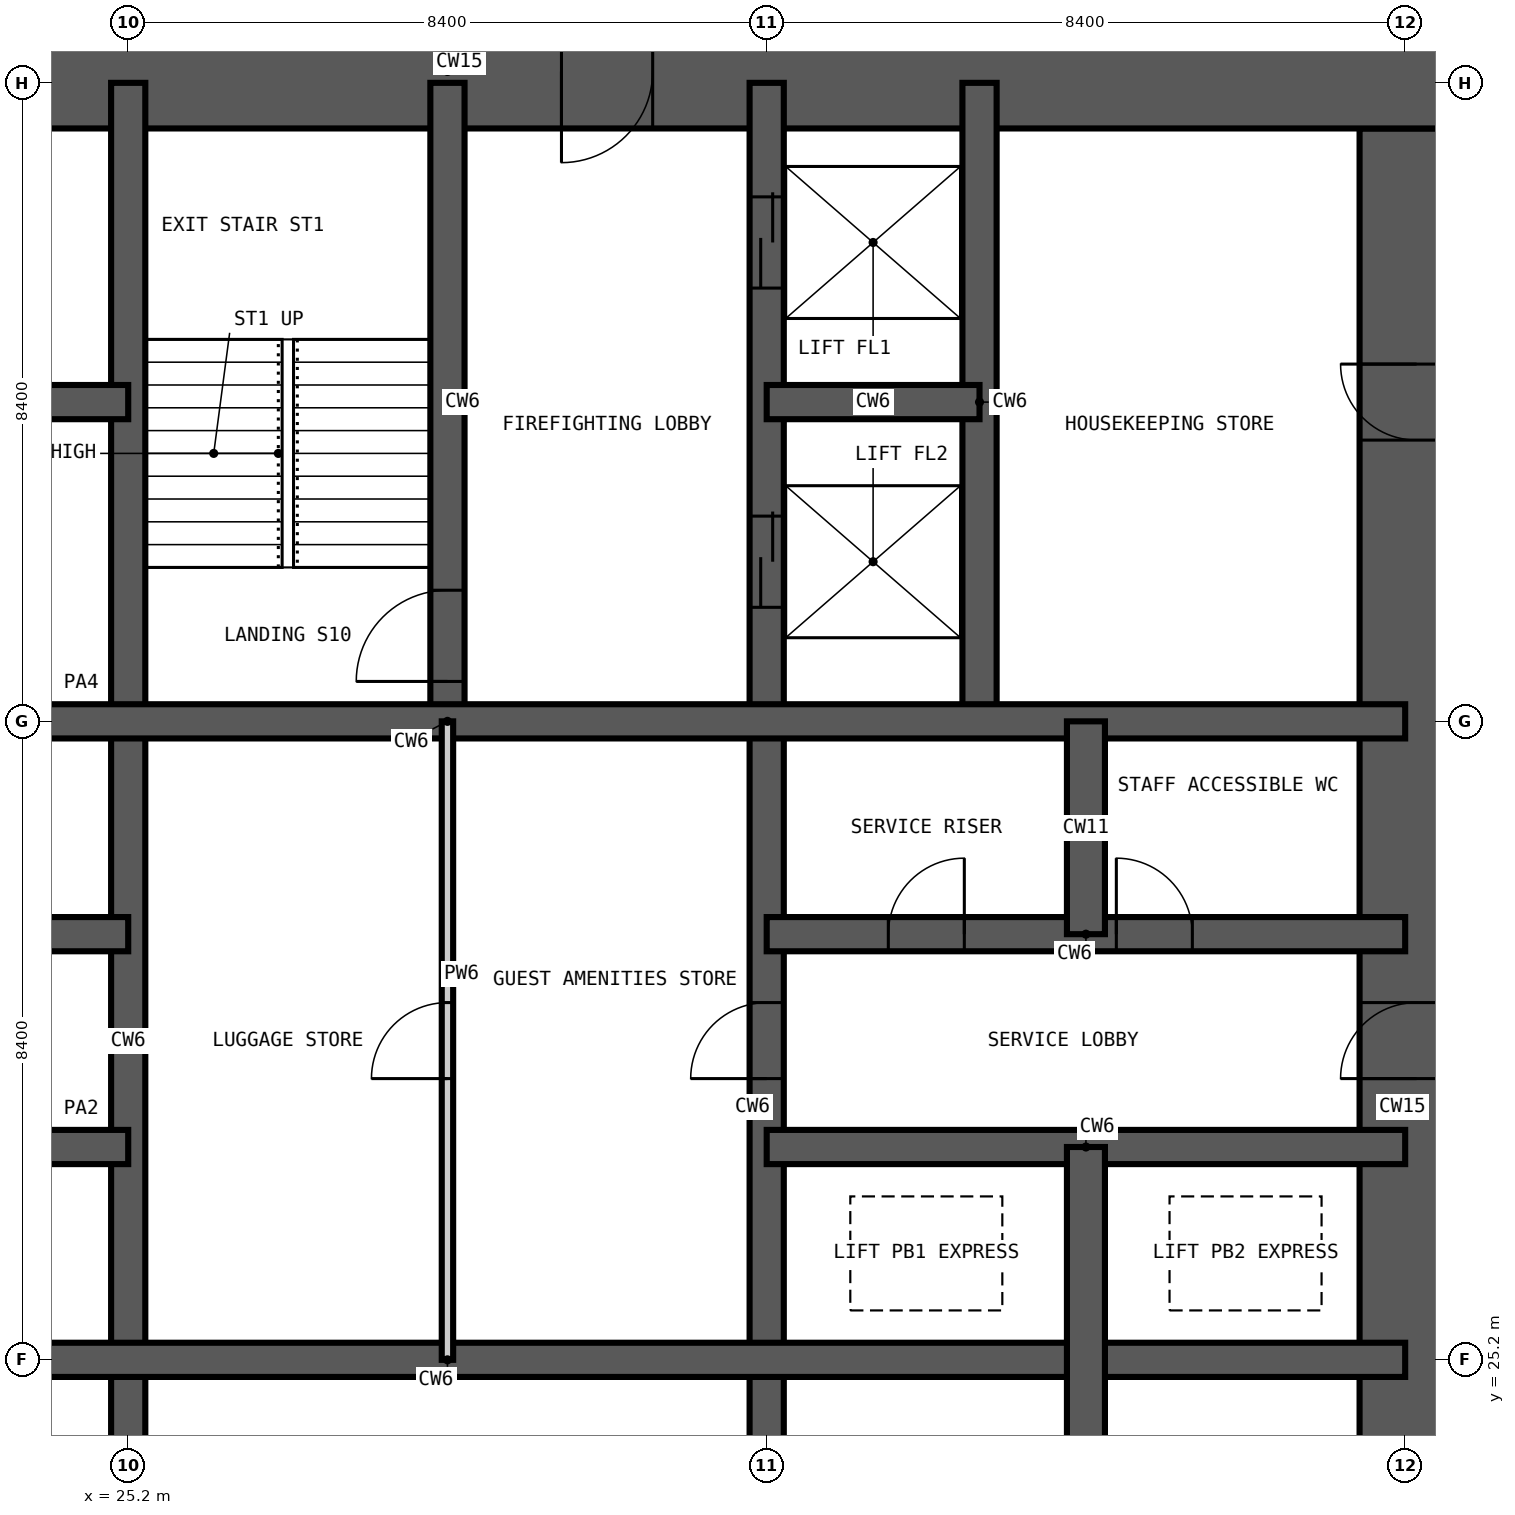
"""IFC4 building model, lengths in metres.
Left out: names, types, materials, properties, quantities, classifications, styles, units other than length and angle.
Written with IfcOpenShell. Run it as: python <this file> out.ifc"""

import sys

from ifc_helpers import new_model, si_unit, direction, frame, frame_2d, origin, place, context, subcontext, project, spatial, rectangle, extrude, element, fill, save


model = new_model("IFC4")
c1 = context("Model", 3, precision=1e-05, world=origin(), true_north=direction((0.0, 1.0)))
c2 = subcontext(c1, "Body", "Model", "MODEL_VIEW")
j1 = project(units=[si_unit("LENGTHUNIT", "METRE"), si_unit("PLANEANGLEUNIT", "RADIAN")], contexts=[c1])
p1 = place(None, origin())
s1 = spatial("IfcSite", under=j1, at=p1, CompositionType="ELEMENT")
p2 = place(p1, origin())
s2 = spatial("IfcBuilding", under=s1, at=p2, CompositionType="ELEMENT")
p3 = place(p2, frame((0.0, 0.0, 81.0)))
s3 = spatial("IfcBuildingStorey", under=s2, at=p3, CompositionType="ELEMENT", Elevation=81.0)
p4 = place(p3, frame((42.15, 17.4, -0.35), z_axis=(0.0, 0.0, 1.0), x_axis=(0.0, 1.0, 0.0)))
e1 = element("IfcWall", 1, at=p4, inside=s3, PredefinedType="SHEAR", context=c2, shape_type="SweptSolid", body=[
    extrude(rectangle(XDim=24.0, YDim=1.5, at=frame_2d((12.0, 0.0))), origin(), (0.0, 0.0, 1.0), 3.6),
])
p5 = place(p4, frame((0.2, 0.0, 0.35)))
e2 = element("IfcOpeningElement", 2, at=p5, cuts=e1, PredefinedType="OPENING", context=c2, shape_type="SweptSolid", body=[
    extrude(rectangle(XDim=1.2, YDim=2.2, at=frame_2d((0.6, 1.1))), frame((0.0, 0.76, 0.0), z_axis=(0.0, -1.0, 0.0), x_axis=(1.0, 0.0, 0.0)), (0.0, 0.0, 1.0), 1.52),
])
p6 = place(p4, frame((11.5, 0.0, 0.35)))
e3 = element("IfcOpeningElement", 3, at=p6, cuts=e1, PredefinedType="OPENING", context=c2, shape_type="SweptSolid", body=[
    extrude(rectangle(XDim=1.0, YDim=2.1, at=frame_2d((0.5, 1.05))), frame((0.0, 0.76, 0.0), z_axis=(0.0, -1.0, 0.0), x_axis=(1.0, 0.0, 0.0)), (0.0, 0.0, 1.0), 1.52),
])
p7 = place(p4, frame((19.9, 0.0, 0.35)))
e4 = element("IfcOpeningElement", 4, at=p7, cuts=e1, PredefinedType="OPENING", context=c2, shape_type="SweptSolid", body=[
    extrude(rectangle(XDim=1.0, YDim=2.1, at=frame_2d((0.5, 1.05))), frame((0.0, 0.76, 0.0), z_axis=(0.0, -1.0, 0.0), x_axis=(1.0, 0.0, 0.0)), (0.0, 0.0, 1.0), 1.52),
])
p8 = place(p3, frame((42.9, 42.15, -0.35), z_axis=(0.0, 0.0, 1.0), x_axis=(-1.0, 0.0, 0.0)))
e5 = element("IfcWall", 5, at=p8, inside=s3, PredefinedType="SHEAR", context=c2, shape_type="SweptSolid", body=[
    extrude(rectangle(XDim=27.0, YDim=1.5, at=frame_2d((13.5, 0.0))), origin(), (0.0, 0.0, 1.0), 3.6),
])
p9 = place(p8, frame((21.4, 0.0, 0.35)))
e6 = element("IfcOpeningElement", 6, at=p9, cuts=e5, PredefinedType="OPENING", context=c2, shape_type="SweptSolid", body=[
    extrude(rectangle(XDim=1.0, YDim=2.1, at=frame_2d((0.5, 1.05))), frame((0.0, 0.76, 0.0), z_axis=(0.0, -1.0, 0.0), x_axis=(1.0, 0.0, 0.0)), (0.0, 0.0, 1.0), 1.52),
])
p10 = place(p8, frame((10.8, 0.0, 0.35)))
e7 = element("IfcOpeningElement", 7, at=p10, cuts=e5, PredefinedType="OPENING", context=c2, shape_type="SweptSolid", body=[
    extrude(rectangle(XDim=1.2, YDim=2.2, at=frame_2d((0.6, 1.1))), frame((0.0, 0.76, 0.0), z_axis=(0.0, -1.0, 0.0), x_axis=(1.0, 0.0, 0.0)), (0.0, 0.0, 1.0), 1.52),
])
p11 = place(p3, frame((25.2, 16.8, -0.35), z_axis=(0.0, 0.0, 1.0), x_axis=(0.0, 1.0, 0.0)))
e8 = element("IfcWall", 8, at=p11, inside=s3, PredefinedType="SHEAR", context=c2, shape_type="SweptSolid", body=[
    extrude(rectangle(XDim=25.2, YDim=0.45, at=frame_2d((12.6, 0.0))), origin(), (0.0, 0.0, 1.0), 3.6),
])
p12 = place(p3, frame((29.4, 33.6, -0.35), z_axis=(0.0, 0.0, 1.0), x_axis=(0.0, 1.0, 0.0)))
e9 = element("IfcWall", 9, at=p12, inside=s3, PredefinedType="SHEAR", context=c2, shape_type="SweptSolid", body=[
    extrude(rectangle(XDim=8.4, YDim=0.45, at=frame_2d((4.2, 0.0))), origin(), (0.0, 0.0, 1.0), 3.6),
])
p13 = place(p12, frame((0.525, 0.0, 0.35)))
e10 = element("IfcOpeningElement", 10, at=p13, cuts=e9, PredefinedType="OPENING", context=c2, shape_type="SweptSolid", body=[
    extrude(rectangle(XDim=1.2, YDim=2.2, at=frame_2d((0.6, 1.1))), frame((0.0, 0.235, 0.0), z_axis=(0.0, -1.0, 0.0), x_axis=(1.0, 0.0, 0.0)), (0.0, 0.0, 1.0), 0.47),
])
p14 = place(p3, frame((33.6, 16.8, -0.35), z_axis=(0.0, 0.0, 1.0), x_axis=(0.0, 1.0, 0.0)))
e11 = element("IfcWall", 11, at=p14, inside=s3, PredefinedType="SHEAR", context=c2, shape_type="SweptSolid", body=[
    extrude(rectangle(XDim=25.2, YDim=0.45, at=frame_2d((12.6, 0.0))), origin(), (0.0, 0.0, 1.0), 3.6),
])
p15 = place(p14, frame((22.5, 0.0, 0.35)))
e12 = element("IfcOpeningElement", 12, at=p15, cuts=e11, PredefinedType="OPENING", context=c2, shape_type="SweptSolid", body=[
    extrude(rectangle(XDim=1.2, YDim=2.2, at=frame_2d((0.6, 1.1))), frame((0.0, 0.235, 0.0), z_axis=(0.0, -1.0, 0.0), x_axis=(1.0, 0.0, 0.0)), (0.0, 0.0, 1.0), 0.47),
])
p16 = place(p14, frame((18.3, 0.0, 0.35)))
e13 = element("IfcOpeningElement", 13, at=p16, cuts=e11, PredefinedType="OPENING", context=c2, shape_type="SweptSolid", body=[
    extrude(rectangle(XDim=1.2, YDim=2.2, at=frame_2d((0.6, 1.1))), frame((0.0, 0.235, 0.0), z_axis=(0.0, -1.0, 0.0), x_axis=(1.0, 0.0, 0.0)), (0.0, 0.0, 1.0), 0.47),
])
p17 = place(p14, frame((12.1, 0.0, 0.35)))
e14 = element("IfcOpeningElement", 14, at=p17, cuts=e11, PredefinedType="OPENING", context=c2, shape_type="SweptSolid", body=[
    extrude(rectangle(XDim=1.0, YDim=2.1, at=frame_2d((0.5, 1.05))), frame((0.0, 0.235, 0.0), z_axis=(0.0, -1.0, 0.0), x_axis=(1.0, 0.0, 0.0)), (0.0, 0.0, 1.0), 0.47),
])
p18 = place(p3, frame((36.4, 33.6, -0.35), z_axis=(0.0, 0.0, 1.0), x_axis=(0.0, 1.0, 0.0)))
e15 = element("IfcWall", 15, at=p18, inside=s3, PredefinedType="SHEAR", context=c2, shape_type="SweptSolid", body=[
    extrude(rectangle(XDim=8.4, YDim=0.45, at=frame_2d((4.2, 0.0))), origin(), (0.0, 0.0, 1.0), 3.6),
])
p19 = place(p3, frame((16.8, 25.2, -0.35), z_axis=(0.0, 0.0, 1.0), x_axis=(1.0, 0.0, 0.0)))
e16 = element("IfcWall", 16, at=p19, inside=s3, PredefinedType="SHEAR", context=c2, shape_type="SweptSolid", body=[
    extrude(rectangle(XDim=25.2, YDim=0.45, at=frame_2d((12.6, 0.0))), origin(), (0.0, 0.0, 1.0), 3.6),
])
p20 = place(p3, frame((16.8, 28.0, -0.35), z_axis=(0.0, 0.0, 1.0), x_axis=(1.0, 0.0, 0.0)))
e17 = element("IfcWall", 17, at=p20, inside=s3, PredefinedType="SHEAR", context=c2, shape_type="SweptSolid", body=[
    extrude(rectangle(XDim=8.4, YDim=0.45, at=frame_2d((4.2, 0.0))), origin(), (0.0, 0.0, 1.0), 3.6),
])
p21 = place(p20, frame((1.55, 0.0, 0.35)))
e18 = element("IfcOpeningElement", 18, at=p21, cuts=e17, PredefinedType="OPENING", context=c2, shape_type="SweptSolid", body=[
    extrude(rectangle(XDim=1.1, YDim=2.2, at=frame_2d((0.55, 1.1))), frame((0.0, 0.235, 0.0), z_axis=(0.0, -1.0, 0.0), x_axis=(1.0, 0.0, 0.0)), (0.0, 0.0, 1.0), 0.47),
])
p22 = place(p20, frame((5.75, 0.0, 0.35)))
e19 = element("IfcOpeningElement", 19, at=p22, cuts=e17, PredefinedType="OPENING", context=c2, shape_type="SweptSolid", body=[
    extrude(rectangle(XDim=1.1, YDim=2.2, at=frame_2d((0.55, 1.1))), frame((0.0, 0.235, 0.0), z_axis=(0.0, -1.0, 0.0), x_axis=(1.0, 0.0, 0.0)), (0.0, 0.0, 1.0), 0.47),
])
p23 = place(p3, frame((33.6, 28.0, -0.35), z_axis=(0.0, 0.0, 1.0), x_axis=(1.0, 0.0, 0.0)))
e20 = element("IfcWall", 20, at=p23, inside=s3, PredefinedType="SHEAR", context=c2, shape_type="SweptSolid", body=[
    extrude(rectangle(XDim=8.4, YDim=0.45, at=frame_2d((4.2, 0.0))), origin(), (0.0, 0.0, 1.0), 3.6),
])
p24 = place(p3, frame((16.8, 30.8, -0.35), z_axis=(0.0, 0.0, 1.0), x_axis=(1.0, 0.0, 0.0)))
e21 = element("IfcWall", 21, at=p24, inside=s3, PredefinedType="SHEAR", context=c2, shape_type="SweptSolid", body=[
    extrude(rectangle(XDim=8.4, YDim=0.45, at=frame_2d((4.2, 0.0))), origin(), (0.0, 0.0, 1.0), 3.6),
])
p25 = place(p24, frame((1.55, 0.0, 0.35)))
e22 = element("IfcOpeningElement", 22, at=p25, cuts=e21, PredefinedType="OPENING", context=c2, shape_type="SweptSolid", body=[
    extrude(rectangle(XDim=1.1, YDim=2.2, at=frame_2d((0.55, 1.1))), frame((0.0, 0.235, 0.0), z_axis=(0.0, -1.0, 0.0), x_axis=(1.0, 0.0, 0.0)), (0.0, 0.0, 1.0), 0.47),
])
p26 = place(p24, frame((5.75, 0.0, 0.35)))
e23 = element("IfcOpeningElement", 23, at=p26, cuts=e21, PredefinedType="OPENING", context=c2, shape_type="SweptSolid", body=[
    extrude(rectangle(XDim=1.1, YDim=2.2, at=frame_2d((0.55, 1.1))), frame((0.0, 0.235, 0.0), z_axis=(0.0, -1.0, 0.0), x_axis=(1.0, 0.0, 0.0)), (0.0, 0.0, 1.0), 0.47),
])
p27 = place(p3, frame((33.6, 30.8, -0.35), z_axis=(0.0, 0.0, 1.0), x_axis=(1.0, 0.0, 0.0)))
e24 = element("IfcWall", 24, at=p27, inside=s3, PredefinedType="SHEAR", context=c2, shape_type="SweptSolid", body=[
    extrude(rectangle(XDim=8.4, YDim=0.45, at=frame_2d((4.2, 0.0))), origin(), (0.0, 0.0, 1.0), 3.6),
])
p28 = place(p27, frame((1.6, 0.0, 0.35)))
e25 = element("IfcOpeningElement", 25, at=p28, cuts=e24, PredefinedType="OPENING", context=c2, shape_type="SweptSolid", body=[
    extrude(rectangle(XDim=1.0, YDim=2.1, at=frame_2d((0.5, 1.05))), frame((0.0, 0.235, 0.0), z_axis=(0.0, -1.0, 0.0), x_axis=(1.0, 0.0, 0.0)), (0.0, 0.0, 1.0), 0.47),
])
p29 = place(p27, frame((4.6, 0.0, 0.35)))
e26 = element("IfcOpeningElement", 26, at=p29, cuts=e24, PredefinedType="OPENING", context=c2, shape_type="SweptSolid", body=[
    extrude(rectangle(XDim=1.0, YDim=2.1, at=frame_2d((0.5, 1.05))), frame((0.0, 0.235, 0.0), z_axis=(0.0, -1.0, 0.0), x_axis=(1.0, 0.0, 0.0)), (0.0, 0.0, 1.0), 0.47),
])
p30 = place(p3, frame((16.8, 33.6, -0.35), z_axis=(0.0, 0.0, 1.0), x_axis=(1.0, 0.0, 0.0)))
e27 = element("IfcWall", 27, at=p30, inside=s3, PredefinedType="SHEAR", context=c2, shape_type="SweptSolid", body=[
    extrude(rectangle(XDim=25.2, YDim=0.45, at=frame_2d((12.6, 0.0))), origin(), (0.0, 0.0, 1.0), 3.6),
])
p31 = place(p3, frame((16.8, 37.8, -0.35), z_axis=(0.0, 0.0, 1.0), x_axis=(1.0, 0.0, 0.0)))
e28 = element("IfcWall", 28, at=p31, inside=s3, PredefinedType="SHEAR", context=c2, shape_type="SweptSolid", body=[
    extrude(rectangle(XDim=8.4, YDim=0.45, at=frame_2d((4.2, 0.0))), origin(), (0.0, 0.0, 1.0), 3.6),
])
p32 = place(p3, frame((33.6, 37.8, -0.35), z_axis=(0.0, 0.0, 1.0), x_axis=(1.0, 0.0, 0.0)))
e29 = element("IfcWall", 29, at=p32, inside=s3, PredefinedType="SHEAR", context=c2, shape_type="SweptSolid", body=[
    extrude(rectangle(XDim=2.8, YDim=0.45, at=frame_2d((1.4, 0.0))), origin(), (0.0, 0.0, 1.0), 3.6),
])
p33 = place(p3, frame((37.8, 16.8, -0.35), z_axis=(0.0, 0.0, 1.0), x_axis=(0.0, 1.0, 0.0)))
e30 = element("IfcWall", 30, at=p33, inside=s3, PredefinedType="SHEAR", context=c2, shape_type="SweptSolid", body=[
    extrude(rectangle(XDim=11.2, YDim=0.5, at=frame_2d((5.6, 0.0))), origin(), (0.0, 0.0, 1.0), 3.6),
])
p34 = place(p3, frame((37.8, 30.8, -0.35), z_axis=(0.0, 0.0, 1.0), x_axis=(0.0, 1.0, 0.0)))
e31 = element("IfcWall", 31, at=p34, inside=s3, PredefinedType="SHEAR", context=c2, shape_type="SweptSolid", body=[
    extrude(rectangle(XDim=2.8, YDim=0.5, at=frame_2d((1.4, 0.0))), origin(), (0.0, 0.0, 1.0), 3.6),
])
p35 = place(p3, frame((29.4, 25.2, 0.0), z_axis=(0.0, 0.0, 1.0), x_axis=(0.0, 1.0, 0.0)))
e32 = element("IfcWall", 32, at=p35, inside=s3, PredefinedType="PARTITIONING", context=c2, shape_type="SweptSolid", body=[
    extrude(rectangle(XDim=8.4, YDim=0.15, at=frame_2d((4.2, 0.0))), origin(), (0.0, 0.0, 1.0), 3.25),
])
p36 = place(p35, frame((3.7, 0.0, 0.0)))
e33 = element("IfcOpeningElement", 33, at=p36, cuts=e32, PredefinedType="OPENING", context=c2, shape_type="SweptSolid", body=[
    extrude(rectangle(XDim=1.0, YDim=2.1, at=frame_2d((0.5, 1.05))), frame((0.0, 0.085, 0.0), z_axis=(0.0, -1.0, 0.0), x_axis=(1.0, 0.0, 0.0)), (0.0, 0.0, 1.0), 0.17),
])
p37 = place(p13, origin())
e34 = element("IfcDoor", 34, at=p37, inside=s3, OperationType="SINGLE_SWING_LEFT", PredefinedType="DOOR", context=c2, shape_type="SweptSolid", body=[
    extrude(rectangle(XDim=1.2, YDim=2.2, at=frame_2d((0.6, 1.1))), frame((0.0, 0.025, 0.0), z_axis=(0.0, -1.0, 0.0), x_axis=(1.0, 0.0, 0.0)), (0.0, 0.0, 1.0), 0.05),
])
fill(e10, e34)
p38 = place(p15, origin())
e35 = element("IfcDoor", 35, at=p38, inside=s3, OperationType="DOUBLE_DOOR_SLIDING", PredefinedType="DOOR", context=c2, shape_type="SweptSolid", body=[
    extrude(rectangle(XDim=1.2, YDim=2.2, at=frame_2d((0.6, 1.1))), frame((0.0, 0.025, 0.0), z_axis=(0.0, -1.0, 0.0), x_axis=(1.0, 0.0, 0.0)), (0.0, 0.0, 1.0), 0.05),
])
fill(e12, e35)
p39 = place(p16, origin())
e36 = element("IfcDoor", 36, at=p39, inside=s3, OperationType="DOUBLE_DOOR_SLIDING", PredefinedType="DOOR", context=c2, shape_type="SweptSolid", body=[
    extrude(rectangle(XDim=1.2, YDim=2.2, at=frame_2d((0.6, 1.1))), frame((0.0, 0.025, 0.0), z_axis=(0.0, -1.0, 0.0), x_axis=(1.0, 0.0, 0.0)), (0.0, 0.0, 1.0), 0.05),
])
fill(e13, e36)
p40 = place(p17, origin())
e37 = element("IfcDoor", 37, at=p40, inside=s3, OperationType="SINGLE_SWING_LEFT", PredefinedType="DOOR", context=c2, shape_type="SweptSolid", body=[
    extrude(rectangle(XDim=1.0, YDim=2.1, at=frame_2d((0.5, 1.05))), frame((0.0, 0.025, 0.0), z_axis=(0.0, -1.0, 0.0), x_axis=(1.0, 0.0, 0.0)), (0.0, 0.0, 1.0), 0.05),
])
fill(e14, e37)
p41 = place(p36, origin())
e38 = element("IfcDoor", 38, at=p41, inside=s3, OperationType="SINGLE_SWING_LEFT", PredefinedType="DOOR", context=c2, shape_type="SweptSolid", body=[
    extrude(rectangle(XDim=1.0, YDim=2.1, at=frame_2d((0.5, 1.05))), frame((0.0, 0.025, 0.0), z_axis=(0.0, -1.0, 0.0), x_axis=(1.0, 0.0, 0.0)), (0.0, 0.0, 1.0), 0.05),
])
fill(e33, e38)
p42 = place(p28, origin())
e39 = element("IfcDoor", 39, at=p42, inside=s3, OperationType="SINGLE_SWING_RIGHT", PredefinedType="DOOR", context=c2, shape_type="SweptSolid", body=[
    extrude(rectangle(XDim=1.0, YDim=2.1, at=frame_2d((0.5, 1.05))), frame((0.0, 0.025, 0.0), z_axis=(0.0, -1.0, 0.0), x_axis=(1.0, 0.0, 0.0)), (0.0, 0.0, 1.0), 0.05),
])
fill(e25, e39)
p43 = place(p29, origin())
e40 = element("IfcDoor", 40, at=p43, inside=s3, OperationType="SINGLE_SWING_LEFT", PredefinedType="DOOR", context=c2, shape_type="SweptSolid", body=[
    extrude(rectangle(XDim=1.0, YDim=2.1, at=frame_2d((0.5, 1.05))), frame((0.0, 0.025, 0.0), z_axis=(0.0, -1.0, 0.0), x_axis=(1.0, 0.0, 0.0)), (0.0, 0.0, 1.0), 0.05),
])
fill(e26, e40)
p44 = place(p6, origin())
e41 = element("IfcDoor", 41, at=p44, inside=s3, OperationType="SINGLE_SWING_LEFT", PredefinedType="DOOR", context=c2, shape_type="SweptSolid", body=[
    extrude(rectangle(XDim=1.0, YDim=2.1, at=frame_2d((0.5, 1.05))), frame((0.0, 0.025, 0.0), z_axis=(0.0, -1.0, 0.0), x_axis=(1.0, 0.0, 0.0)), (0.0, 0.0, 1.0), 0.05),
])
fill(e3, e41)
p45 = place(p10, origin())
e42 = element("IfcDoor", 42, at=p45, inside=s3, OperationType="SINGLE_SWING_RIGHT", PredefinedType="DOOR", context=c2, shape_type="SweptSolid", body=[
    extrude(rectangle(XDim=1.2, YDim=2.2, at=frame_2d((0.6, 1.1))), frame((0.0, 0.025, 0.0), z_axis=(0.0, -1.0, 0.0), x_axis=(1.0, 0.0, 0.0)), (0.0, 0.0, 1.0), 0.05),
])
fill(e7, e42)
p46 = place(p7, origin())
e43 = element("IfcDoor", 43, at=p46, inside=s3, OperationType="SINGLE_SWING_RIGHT", PredefinedType="DOOR", context=c2, shape_type="SweptSolid", body=[
    extrude(rectangle(XDim=1.0, YDim=2.1, at=frame_2d((0.5, 1.05))), frame((0.0, 0.025, 0.0), z_axis=(0.0, -1.0, 0.0), x_axis=(1.0, 0.0, 0.0)), (0.0, 0.0, 1.0), 0.05),
])
fill(e4, e43)
save(model, sys.argv[1])
